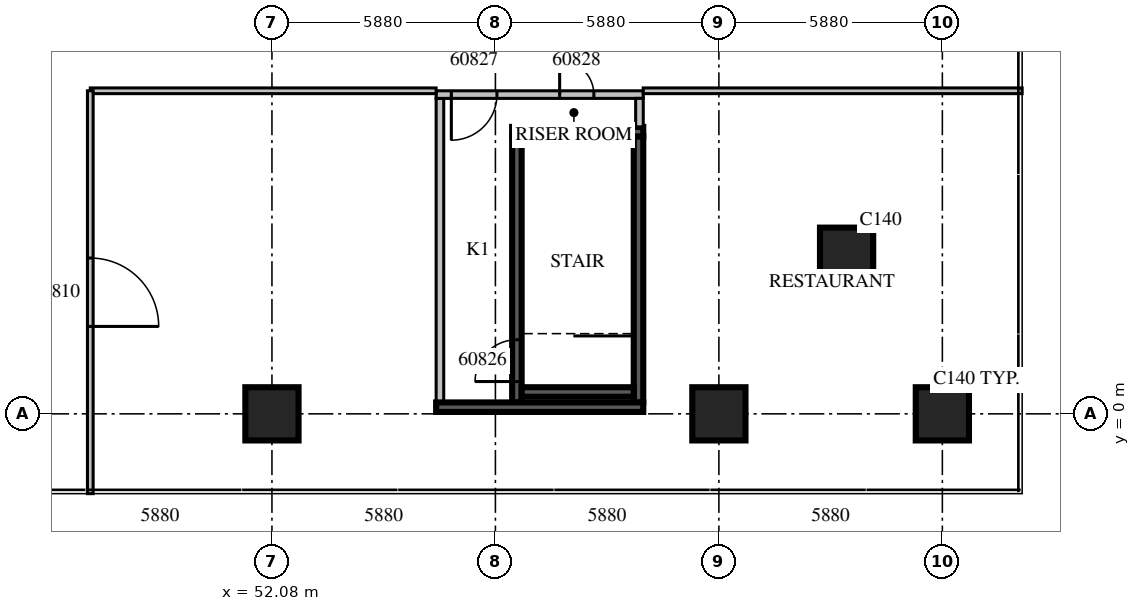
"""IFC4 building model, lengths in metres.
Left out: names, types, materials, properties, quantities, classifications, styles, units other than length and angle.
Written with IfcOpenShell. Run it as: python <this file> out.ifc"""

import sys

from ifc_helpers import new_model, si_unit, direction, frame, frame_2d, origin, origin_2d, place, context, subcontext, project, spatial, rectangle, extrude, source, transform, mapped, element, fill, save


model = new_model("IFC4")
c1 = context("Model", 3, precision=1e-05, world=origin(), true_north=direction((0.0, 1.0)))
c2 = subcontext(c1, "Body", "Model", "MODEL_VIEW")
j1 = project(units=[si_unit("LENGTHUNIT", "METRE"), si_unit("PLANEANGLEUNIT", "RADIAN")], contexts=[c1])
p1 = place(None, origin())
s1 = spatial("IfcSite", under=j1, at=p1, CompositionType="ELEMENT")
p2 = place(p1, origin())
s2 = spatial("IfcBuilding", under=s1, at=p2, CompositionType="ELEMENT")
p3 = place(p2, frame((0.0, 0.0, 29.1)))
s3 = spatial("IfcBuildingStorey", under=s2, at=p3, CompositionType="ELEMENT", Elevation=29.1)
m1 = source(origin(), c2, "Body", "SweptSolid", [
    extrude(rectangle(XDim=1.4, YDim=1.4, at=origin_2d()), origin(), (0.0, 0.0, 1.0), 5.4),
])
for number, where, z_axis, x_axis in (
    (1, (52.08, 0.0, 0.0), (0.0, 0.0, 1.0), (1.0, 0.0, 0.0)),
    (2, (63.84, 0.0, 0.0), (0.0, 0.0, 1.0), (1.0, 0.0, 0.0)),
    (3, (67.2, 4.2, 0.0), (0.0, 0.0, 1.0), (1.0, 0.0, 0.0)),
    (4, (69.72, 0.0, 0.0), (0.0, 0.0, 1.0), (1.0, 0.0, 0.0)),
):
    element("IfcColumn", number, at=place(p3, frame(where, z_axis=z_axis, x_axis=x_axis)), inside=s3, PredefinedType="COLUMN", context=c2, shape_type="MappedRepresentation", body=[
        mapped(m1, transform((0.0, 0.0, 0.0), scale=1.0)),
    ])
m2 = source(origin(), c2, "Body", "SweptSolid", [
    extrude(rectangle(XDim=7.0, YDim=0.25, at=frame_2d((3.5, 0.0))), origin(), (0.0, 0.0, 1.0), 4.8),
])
p4 = place(p3, frame((58.525, 0.3, 0.0), z_axis=(0.0, 0.0, 1.0), x_axis=(0.0, 1.0, 0.0)))
e5 = element("IfcWall", 5, at=p4, inside=s3, PredefinedType="SOLIDWALL", context=c2, shape_type="MappedRepresentation", body=[
    mapped(m2, transform((0.0, 0.0, 0.0), scale=1.0)),
])
m3 = source(origin(), c2, "Body", "SweptSolid", [
    extrude(rectangle(XDim=1.1, YDim=2.1, at=frame_2d((0.55, 1.05))), frame((0.0, 0.135, 0.0), z_axis=(0.0, -1.0, 0.0), x_axis=(1.0, 0.0, 0.0)), (0.0, 0.0, 1.0), 0.27),
])
p5 = place(p4, frame((0.55, 0.0, 0.0)))
e6 = element("IfcOpeningElement", 6, at=p5, cuts=e5, PredefinedType="OPENING", context=c2, shape_type="MappedRepresentation", body=[
    mapped(m3, transform((0.0, 0.0, 0.0), scale=1.0)),
])
p6 = place(p3, frame((61.725, 0.3, 0.0), z_axis=(0.0, 0.0, 1.0), x_axis=(0.0, 1.0, 0.0)))
e7 = element("IfcWall", 7, at=p6, inside=s3, PredefinedType="SOLIDWALL", context=c2, shape_type="MappedRepresentation", body=[
    mapped(m2, transform((0.0, 0.0, 0.0), scale=1.0)),
])
m4 = source(origin(), c2, "Body", "SweptSolid", [
    extrude(rectangle(XDim=3.45, YDim=0.25, at=frame_2d((1.725, 0.0))), origin(), (0.0, 0.0, 1.0), 4.8),
])
p7 = place(p3, frame((58.4, 7.425, 0.0), z_axis=(0.0, 0.0, 1.0), x_axis=(1.0, 0.0, 0.0)))
e8 = element("IfcWall", 8, at=p7, inside=s3, PredefinedType="SOLIDWALL", context=c2, shape_type="MappedRepresentation", body=[
    mapped(m4, transform((0.0, 0.0, 0.0), scale=1.0)),
])
m5 = source(origin(), c2, "Body", "SweptSolid", [
    extrude(rectangle(XDim=2.95, YDim=0.25, at=frame_2d((1.475, 0.0))), origin(), (0.0, 0.0, 1.0), 4.8),
])
p8 = place(p3, frame((58.65, 0.575, 0.0), z_axis=(0.0, 0.0, 1.0), x_axis=(1.0, 0.0, 0.0)))
e9 = element("IfcWall", 9, at=p8, inside=s3, PredefinedType="SOLIDWALL", context=c2, shape_type="MappedRepresentation", body=[
    mapped(m5, transform((0.0, 0.0, 0.0), scale=1.0)),
])
m6 = source(origin(), c2, "Body", "SweptSolid", [
    extrude(rectangle(XDim=8.0, YDim=0.2, at=frame_2d((4.0, 0.0))), origin(), (0.0, 0.0, 1.0), 4.8),
])
p9 = place(p3, frame((56.5, 0.3, 0.0), z_axis=(0.0, 0.0, 1.0), x_axis=(0.0, 1.0, 0.0)))
e10 = element("IfcWall", 10, at=p9, inside=s3, PredefinedType="PARTITIONING", context=c2, shape_type="MappedRepresentation", body=[
    mapped(m6, transform((0.0, 0.0, 0.0), scale=1.0)),
])
m7 = source(origin(), c2, "Body", "SweptSolid", [
    extrude(rectangle(XDim=5.45, YDim=0.2, at=frame_2d((2.725, 0.0))), origin(), (0.0, 0.0, 1.0), 4.8),
])
p10 = place(p3, frame((56.4, 8.4, 0.0), z_axis=(0.0, 0.0, 1.0), x_axis=(1.0, 0.0, 0.0)))
e11 = element("IfcWall", 11, at=p10, inside=s3, PredefinedType="PARTITIONING", context=c2, shape_type="MappedRepresentation", body=[
    mapped(m7, transform((0.0, 0.0, 0.0), scale=1.0)),
])
m8 = source(origin(), c2, "Body", "SweptSolid", [
    extrude(rectangle(XDim=1.2, YDim=2.1, at=frame_2d((0.6, 1.05))), frame((0.0, 0.11, 0.0), z_axis=(0.0, -1.0, 0.0), x_axis=(1.0, 0.0, 0.0)), (0.0, 0.0, 1.0), 0.22),
])
p11 = place(p10, frame((0.4, 0.0, 0.0)))
e12 = element("IfcOpeningElement", 12, at=p11, cuts=e11, PredefinedType="OPENING", context=c2, shape_type="MappedRepresentation", body=[
    mapped(m8, transform((0.0, 0.0, 0.0), scale=1.0)),
])
m9 = source(origin(), c2, "Body", "SweptSolid", [
    extrude(rectangle(XDim=0.9, YDim=2.1, at=frame_2d((0.45, 1.05))), frame((0.0, 0.11, 0.0), z_axis=(0.0, -1.0, 0.0), x_axis=(1.0, 0.0, 0.0)), (0.0, 0.0, 1.0), 0.22),
])
p12 = place(p10, frame((3.25, 0.0, 0.0)))
e13 = element("IfcOpeningElement", 13, at=p12, cuts=e11, PredefinedType="OPENING", context=c2, shape_type="MappedRepresentation", body=[
    mapped(m9, transform((0.0, 0.0, 0.0), scale=1.0)),
])
m10 = source(origin(), c2, "Body", "SweptSolid", [
    extrude(rectangle(XDim=0.75, YDim=0.2, at=frame_2d((0.375, 0.0))), origin(), (0.0, 0.0, 1.0), 4.8),
])
p13 = place(p3, frame((61.75, 7.55, 0.0), z_axis=(0.0, 0.0, 1.0), x_axis=(0.0, 1.0, 0.0)))
e14 = element("IfcWall", 14, at=p13, inside=s3, PredefinedType="PARTITIONING", context=c2, shape_type="MappedRepresentation", body=[
    mapped(m10, transform((0.0, 0.0, 0.0), scale=1.0)),
])
m11 = source(origin(), c2, "Body", "SweptSolid", [
    extrude(rectangle(XDim=5.45, YDim=0.25, at=frame_2d((2.725, 0.0))), origin(), (0.0, 0.0, 1.0), 4.8),
])
p14 = place(p3, frame((56.4, 0.175, 0.0), z_axis=(0.0, 0.0, 1.0), x_axis=(1.0, 0.0, 0.0)))
e15 = element("IfcWall", 15, at=p14, inside=s3, PredefinedType="SOLIDWALL", context=c2, shape_type="MappedRepresentation", body=[
    mapped(m11, transform((0.0, 0.0, 0.0), scale=1.0)),
])
m12 = source(origin(), c2, "Body", "SweptSolid", [
    extrude(rectangle(XDim=9.1, YDim=0.15, at=frame_2d((4.55, 0.0))), origin(), (0.0, 0.0, 1.0), 4.8),
])
p15 = place(p3, frame((47.3, 8.5, 0.0), z_axis=(0.0, 0.0, 1.0), x_axis=(1.0, 0.0, 0.0)))
e16 = element("IfcWall", 16, at=p15, inside=s3, PredefinedType="PARTITIONING", context=c2, shape_type="MappedRepresentation", body=[
    mapped(m12, transform((0.0, 0.0, 0.0), scale=1.0)),
])
m13 = source(origin(), c2, "Body", "SweptSolid", [
    extrude(rectangle(XDim=9.97, YDim=0.15, at=frame_2d((4.985, 0.0))), origin(), (0.0, 0.0, 1.0), 4.8),
])
p16 = place(p3, frame((61.85, 8.5, 0.0), z_axis=(0.0, 0.0, 1.0), x_axis=(1.0, 0.0, 0.0)))
e17 = element("IfcWall", 17, at=p16, inside=s3, PredefinedType="PARTITIONING", context=c2, shape_type="MappedRepresentation", body=[
    mapped(m13, transform((0.0, 0.0, 0.0), scale=1.0)),
])
m14 = source(origin(), c2, "Body", "SweptSolid", [
    extrude(rectangle(XDim=10.6, YDim=0.15, at=frame_2d((5.3, 0.0))), origin(), (0.0, 0.0, 1.0), 4.8),
])
p17 = place(p3, frame((47.3, -2.1, 0.0), z_axis=(0.0, 0.0, 1.0), x_axis=(0.0, 1.0, 0.0)))
e18 = element("IfcWall", 18, at=p17, inside=s3, PredefinedType="PARTITIONING", context=c2, shape_type="MappedRepresentation", body=[
    mapped(m14, transform((0.0, 0.0, 0.0), scale=1.0)),
])
m15 = source(origin(), c2, "Body", "SweptSolid", [
    extrude(rectangle(XDim=1.8, YDim=2.1, at=frame_2d((0.9, 1.05))), frame((0.0, 0.085, 0.0), z_axis=(0.0, -1.0, 0.0), x_axis=(1.0, 0.0, 0.0)), (0.0, 0.0, 1.0), 0.17),
])
p18 = place(p17, frame((4.4, 0.0, 0.0)))
e19 = element("IfcOpeningElement", 19, at=p18, cuts=e18, PredefinedType="OPENING", context=c2, shape_type="MappedRepresentation", body=[
    mapped(m15, transform((0.0, 0.0, 0.0), scale=1.0)),
])
m16 = source(origin(), c2, "Body", "SweptSolid", [
    extrude(rectangle(XDim=1.1, YDim=2.1, at=frame_2d((0.55, 1.05))), frame((0.0, 0.025, 0.0), z_axis=(0.0, -1.0, 0.0), x_axis=(1.0, 0.0, 0.0)), (0.0, 0.0, 1.0), 0.05),
])
p19 = place(p5, origin())
e20 = element("IfcDoor", 20, at=p19, inside=s3, OperationType="SINGLE_SWING_LEFT", PredefinedType="DOOR", context=c2, shape_type="MappedRepresentation", body=[
    mapped(m16, transform((0.0, 0.0, 0.0), scale=1.0)),
])
fill(e6, e20)
m17 = source(origin(), c2, "Body", "SweptSolid", [
    extrude(rectangle(XDim=1.2, YDim=2.1, at=frame_2d((0.6, 1.05))), frame((0.0, 0.025, 0.0), z_axis=(0.0, -1.0, 0.0), x_axis=(1.0, 0.0, 0.0)), (0.0, 0.0, 1.0), 0.05),
])
p20 = place(p11, origin())
e21 = element("IfcDoor", 21, at=p20, inside=s3, OperationType="SINGLE_SWING_RIGHT", PredefinedType="DOOR", context=c2, shape_type="MappedRepresentation", body=[
    mapped(m17, transform((0.0, 0.0, 0.0), scale=1.0)),
])
fill(e12, e21)
m18 = source(origin(), c2, "Body", "SweptSolid", [
    extrude(rectangle(XDim=0.9, YDim=2.1, at=frame_2d((0.45, 1.05))), frame((0.0, 0.025, 0.0), z_axis=(0.0, -1.0, 0.0), x_axis=(1.0, 0.0, 0.0)), (0.0, 0.0, 1.0), 0.05),
])
p21 = place(p12, origin())
e22 = element("IfcDoor", 22, at=p21, inside=s3, OperationType="SINGLE_SWING_LEFT", PredefinedType="DOOR", context=c2, shape_type="MappedRepresentation", body=[
    mapped(m18, transform((0.0, 0.0, 0.0), scale=1.0)),
])
fill(e13, e22)
m19 = source(origin(), c2, "Body", "SweptSolid", [
    extrude(rectangle(XDim=1.8, YDim=2.1, at=frame_2d((0.9, 1.05))), frame((0.0, 0.025, 0.0), z_axis=(0.0, -1.0, 0.0), x_axis=(1.0, 0.0, 0.0)), (0.0, 0.0, 1.0), 0.05),
])
p22 = place(p18, origin())
e23 = element("IfcDoor", 23, at=p22, inside=s3, OperationType="DOUBLE_DOOR_SINGLE_SWING", PredefinedType="DOOR", context=c2, shape_type="MappedRepresentation", body=[
    mapped(m19, transform((0.0, 0.0, 0.0), scale=1.0)),
])
fill(e19, e23)
save(model, sys.argv[1])
